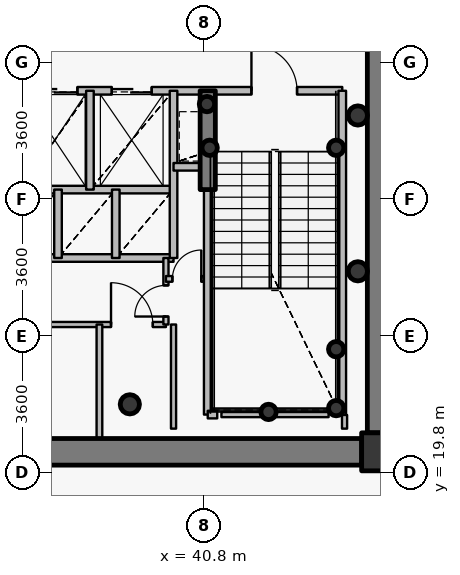
"""IFC4 building model, lengths in metres.
Left out: names, types, materials, properties, quantities, classifications, styles, units other than length and angle.
Written with IfcOpenShell. Run it as: python <this file> out.ifc"""

import sys

from ifc_helpers import new_model, si_unit, direction, frame, frame_2d, origin, origin_2d, place, context, subcontext, project, spatial, rectangle, hollow_circle, extrude, source, transform, mapped, element, fill, save


model = new_model("IFC4")
c1 = context("Model", 3, precision=1e-05, world=origin(), true_north=direction((0.0, 1.0)))
c2 = subcontext(c1, "Body", "Model", "MODEL_VIEW")
j1 = project(units=[si_unit("LENGTHUNIT", "METRE"), si_unit("PLANEANGLEUNIT", "RADIAN")], contexts=[c1])
p1 = place(None, origin())
s1 = spatial("IfcSite", under=j1, at=p1, CompositionType="ELEMENT")
p2 = place(p1, origin())
s2 = spatial("IfcBuilding", under=s1, at=p2, CompositionType="ELEMENT")
p3 = place(p2, frame((0.0, 0.0, 236.55)))
s3 = spatial("IfcBuildingStorey", under=s2, at=p3, CompositionType="ELEMENT", Elevation=236.55)
p4 = place(p3, frame((45.45, 20.35, 0.0), z_axis=(0.0, 0.0, 1.0), x_axis=(1.0, 0.0, 0.0)))
e1 = element("IfcColumn", 1, at=p4, inside=s3, PredefinedType="COLUMN", context=c2, shape_type="SweptSolid", body=[
    extrude(rectangle(XDim=1.0, YDim=1.0, at=origin_2d()), origin(), (0.0, 0.0, 1.0), 3.75),
])
p5 = place(p3, frame((38.85, 21.6, 0.0), z_axis=(0.0, 0.0, 1.0), x_axis=(1.0, 0.0, 0.0)))
e2 = element("IfcColumn", 2, at=p5, inside=s3, PredefinedType="COLUMN", context=c2, shape_type="SweptSolid", body=[
    extrude(hollow_circle(Radius=0.254, WallThickness=0.02, at=origin_2d()), origin(), (0.0, 0.0, 1.0), 3.75),
])
for number, where, z_axis, x_axis in (
    (3, (44.28, 21.5, 0.0), (0.0, 0.0, 1.0), (1.0, 0.0, 0.0)),
    (4, (44.28, 23.05, 0.0), (0.0, 0.0, 1.0), (1.0, 0.0, 0.0)),
    (5, (42.5, 21.4, 0.0), (0.0, 0.0, 1.0), (1.0, 0.0, 0.0)),
    (6, (40.95, 28.35, 0.0), (0.0, 0.0, 1.0), (1.0, 0.0, 0.0)),
    (7, (44.28, 28.35, 0.0), (0.0, 0.0, 1.0), (1.0, 0.0, 0.0)),
    (8, (40.88, 29.5, 0.0), (0.0, 0.0, 1.0), (1.0, 0.0, 0.0)),
):
    element("IfcColumn", number, at=place(p3, frame(where, z_axis=z_axis, x_axis=x_axis)), inside=s3, PredefinedType="COLUMN", context=c2, shape_type="SweptSolid", body=[
        extrude(hollow_circle(Radius=0.203, WallThickness=0.016, at=origin_2d()), origin(), (0.0, 0.0, 1.0), 3.75),
    ])
p6 = place(p3, frame((45.45, 33.15, 0.0), z_axis=(0.0, 0.0, 1.0), x_axis=(0.0, -1.0, 0.0)))
e9 = element("IfcWall", 9, at=p6, inside=s3, PredefinedType="SHEAR", context=c2, shape_type="SweptSolid", body=[
    extrude(rectangle(XDim=12.3, YDim=0.7, at=frame_2d((6.15, 0.0))), origin(), (0.0, 0.0, 1.0), 3.05),
])
p7 = place(p3, frame((44.95, 20.35, 0.0), z_axis=(0.0, 0.0, 1.0), x_axis=(-1.0, 0.0, 0.0)))
e10 = element("IfcWall", 10, at=p7, inside=s3, PredefinedType="SHEAR", context=c2, shape_type="SweptSolid", body=[
    extrude(rectangle(XDim=17.9, YDim=0.7, at=frame_2d((8.95, 0.0))), origin(), (0.0, 0.0, 1.0), 3.05),
])
p8 = place(p7, frame((9.7, 0.0, 0.0)))
e11 = element("IfcOpeningElement", 11, at=p8, cuts=e10, PredefinedType="OPENING", context=c2, shape_type="SweptSolid", body=[
    extrude(rectangle(XDim=1.15, YDim=2.15, at=origin_2d()), frame((0.575, 0.36, 1.075), z_axis=(0.0, -1.0, 0.0), x_axis=(1.0, 0.0, 0.0)), (0.0, 0.0, 1.0), 0.72),
])
p9 = place(p3, frame((40.9, 27.25, 0.0), z_axis=(0.0, 0.0, 1.0), x_axis=(0.0, 1.0, 0.0)))
e12 = element("IfcWall", 12, at=p9, inside=s3, PredefinedType="SHEAR", context=c2, shape_type="SweptSolid", body=[
    extrude(rectangle(XDim=2.6, YDim=0.4, at=frame_2d((1.3, 0.0))), origin(), (0.0, 0.0, 1.0), 3.1),
])
for number, where, z_axis, x_axis in (
    (13, (44.85, 25.1, 0.0), (0.0, 0.0, 1.0), (1.0, 0.0, 0.0)),
    (14, (44.85, 29.2, 0.0), (0.0, 0.0, 1.0), (1.0, 0.0, 0.0)),
):
    element("IfcColumn", number, at=place(p3, frame(where, z_axis=z_axis, x_axis=x_axis)), inside=s3, PredefinedType="COLUMN", context=c2, shape_type="SweptSolid", body=[
        extrude(hollow_circle(Radius=0.254, WallThickness=0.02, at=origin_2d()), origin(), (0.0, 0.0, 1.0), 3.75),
    ])
p10 = place(p3, frame((35.05, 27.25, 0.0), z_axis=(0.0, 0.0, 1.0), x_axis=(1.0, 0.0, 0.0)))
e15 = element("IfcWall", 15, at=p10, inside=s3, PredefinedType="PARTITIONING", context=c2, shape_type="SweptSolid", body=[
    extrude(rectangle(XDim=4.95, YDim=0.2, at=frame_2d((2.475, 0.0))), origin(), (0.0, 0.0, 1.0), 3.085),
])
p11 = place(p3, frame((35.45, 23.7, 0.0), z_axis=(0.0, 0.0, 1.0), x_axis=(1.0, 0.0, 0.0)))
e16 = element("IfcWall", 16, at=p11, inside=s3, PredefinedType="PARTITIONING", context=c2, shape_type="SweptSolid", body=[
    extrude(rectangle(XDim=4.35, YDim=0.135, at=frame_2d((2.175, 0.0))), origin(), (0.0, 0.0, 1.0), 3.085),
])
p12 = place(p11, frame((2.905, 0.0, 0.0)))
e17 = element("IfcOpeningElement", 17, at=p12, cuts=e16, PredefinedType="OPENING", context=c2, shape_type="SweptSolid", body=[
    extrude(rectangle(XDim=1.1, YDim=2.15, at=origin_2d()), frame((0.55, 0.078, 1.075), z_axis=(0.0, -1.0, 0.0), x_axis=(1.0, 0.0, 0.0)), (0.0, 0.0, 1.0), 0.155),
])
p13 = place(p3, frame((35.45, 25.45, 0.0), z_axis=(0.0, 0.0, 1.0), x_axis=(1.0, 0.0, 0.0)))
e18 = element("IfcWall", 18, at=p13, inside=s3, PredefinedType="PARTITIONING", context=c2, shape_type="SweptSolid", body=[
    extrude(rectangle(XDim=4.55, YDim=0.2, at=frame_2d((2.275, 0.0))), origin(), (0.0, 0.0, 1.0), 3.085),
])
p14 = place(p3, frame((35.95, 29.85, 0.0), z_axis=(0.0, 0.0, 1.0), x_axis=(1.0, 0.0, 0.0)))
e19 = element("IfcWall", 19, at=p14, inside=s3, PredefinedType="PARTITIONING", context=c2, shape_type="SweptSolid", body=[
    extrude(rectangle(XDim=8.49, YDim=0.2, at=frame_2d((4.245, 0.0))), origin(), (0.0, 0.0, 1.0), 3.085),
])
p15 = place(p14, frame((6.1, 0.0, 0.0)))
e20 = element("IfcOpeningElement", 20, at=p15, cuts=e19, PredefinedType="OPENING", context=c2, shape_type="SweptSolid", body=[
    extrude(rectangle(XDim=1.2, YDim=2.15, at=origin_2d()), frame((0.6, 0.11, 1.075), z_axis=(0.0, -1.0, 0.0), x_axis=(1.0, 0.0, 0.0)), (0.0, 0.0, 1.0), 0.22),
])
p16 = place(p14, frame((0.37, 0.0, 0.0)))
e21 = element("IfcOpeningElement", 21, at=p16, cuts=e19, PredefinedType="OPENING", context=c2, shape_type="SweptSolid", body=[
    extrude(rectangle(XDim=1.15, YDim=2.15, at=origin_2d()), frame((0.575, 0.11, 1.075), z_axis=(0.0, -1.0, 0.0), x_axis=(1.0, 0.0, 0.0)), (0.0, 0.0, 1.0), 0.22),
])
p17 = place(p14, frame((2.425, 0.0, 0.0)))
e22 = element("IfcOpeningElement", 22, at=p17, cuts=e19, PredefinedType="OPENING", context=c2, shape_type="SweptSolid", body=[
    extrude(rectangle(XDim=1.05, YDim=2.15, at=origin_2d()), frame((0.525, 0.11, 1.075), z_axis=(0.0, -1.0, 0.0), x_axis=(1.0, 0.0, 0.0)), (0.0, 0.0, 1.0), 0.22),
])
p18 = place(p3, frame((36.96, 25.45, 0.0), z_axis=(0.0, 0.0, 1.0), x_axis=(0.0, 1.0, 0.0)))
e23 = element("IfcWall", 23, at=p18, inside=s3, PredefinedType="PARTITIONING", context=c2, shape_type="SweptSolid", body=[
    extrude(rectangle(XDim=1.8, YDim=0.2, at=frame_2d((0.9, 0.0))), origin(), (0.0, 0.0, 1.0), 3.5),
])
p19 = place(p3, frame((37.8, 27.25, 0.0), z_axis=(0.0, 0.0, 1.0), x_axis=(0.0, 1.0, 0.0)))
e24 = element("IfcWall", 24, at=p19, inside=s3, PredefinedType="PARTITIONING", context=c2, shape_type="SweptSolid", body=[
    extrude(rectangle(XDim=2.6, YDim=0.2, at=frame_2d((1.3, 0.0))), origin(), (0.0, 0.0, 1.0), 3.5),
])
p20 = place(p3, frame((38.05, 20.18, 0.0), z_axis=(0.0, 0.0, 1.0), x_axis=(0.0, 1.0, 0.0)))
e25 = element("IfcWall", 25, at=p20, inside=s3, PredefinedType="PARTITIONING", context=c2, shape_type="SweptSolid", body=[
    extrude(rectangle(XDim=3.52, YDim=0.15, at=frame_2d((1.76, 0.0))), origin(), (0.0, 0.0, 1.0), 3.035),
])
p21 = place(p3, frame((38.48, 25.45, 0.0), z_axis=(0.0, 0.0, 1.0), x_axis=(0.0, 1.0, 0.0)))
e26 = element("IfcWall", 26, at=p21, inside=s3, PredefinedType="PARTITIONING", context=c2, shape_type="SweptSolid", body=[
    extrude(rectangle(XDim=1.8, YDim=0.2, at=frame_2d((0.9, 0.0))), origin(), (0.0, 0.0, 1.0), 3.5),
])
p22 = place(p3, frame((39.8, 23.7, 0.0), z_axis=(0.0, 0.0, 1.0), x_axis=(0.0, 1.0, 0.0)))
e27 = element("IfcWall", 27, at=p22, inside=s3, PredefinedType="PARTITIONING", context=c2, shape_type="SweptSolid", body=[
    extrude(rectangle(XDim=1.75, YDim=0.135, at=frame_2d((0.875, 0.0))), origin(), (0.0, 0.0, 1.0), 3.5),
])
p23 = place(p22, frame((0.21, 0.0, 0.0)))
e28 = element("IfcOpeningElement", 28, at=p23, cuts=e27, PredefinedType="OPENING", context=c2, shape_type="SweptSolid", body=[
    extrude(rectangle(XDim=0.82, YDim=2.1, at=origin_2d()), frame((0.41, 0.078, 1.05), z_axis=(0.0, -1.0, 0.0), x_axis=(1.0, 0.0, 0.0)), (0.0, 0.0, 1.0), 0.155),
])
p24 = place(p3, frame((39.8, 24.9, 0.0), z_axis=(0.0, 0.0, 1.0), x_axis=(1.0, 0.0, 0.0)))
e29 = element("IfcWall", 29, at=p24, inside=s3, PredefinedType="PARTITIONING", context=c2, shape_type="SweptSolid", body=[
    extrude(rectangle(XDim=1.1, YDim=0.15, at=frame_2d((0.55, 0.0))), origin(), (0.0, 0.0, 1.0), 3.5),
])
p25 = place(p24, frame((0.17, 0.0, 0.0)))
e30 = element("IfcOpeningElement", 30, at=p25, cuts=e29, PredefinedType="OPENING", context=c2, shape_type="SweptSolid", body=[
    extrude(rectangle(XDim=0.76, YDim=2.1, at=origin_2d()), frame((0.38, 0.085, 1.05), z_axis=(0.0, -1.0, 0.0), x_axis=(1.0, 0.0, 0.0)), (0.0, 0.0, 1.0), 0.17),
])
p26 = place(p3, frame((40.0, 25.45, 0.0), z_axis=(0.0, 0.0, 1.0), x_axis=(0.0, 1.0, 0.0)))
e31 = element("IfcWall", 31, at=p26, inside=s3, PredefinedType="PARTITIONING", context=c2, shape_type="SweptSolid", body=[
    extrude(rectangle(XDim=4.4, YDim=0.2, at=frame_2d((2.2, 0.0))), origin(), (0.0, 0.0, 1.0), 3.5),
])
p27 = place(p3, frame((40.0, 27.85, 0.0), z_axis=(0.0, 0.0, 1.0), x_axis=(1.0, 0.0, 0.0)))
e32 = element("IfcWall", 32, at=p27, inside=s3, PredefinedType="PARTITIONING", context=c2, shape_type="SweptSolid", body=[
    extrude(rectangle(XDim=0.9, YDim=0.2, at=frame_2d((0.45, 0.0))), origin(), (0.0, 0.0, 1.0), 3.5),
])
p28 = place(p3, frame((40.9, 21.33, 0.0), z_axis=(0.0, 0.0, 1.0), x_axis=(0.0, 1.0, 0.0)))
e33 = element("IfcWall", 33, at=p28, inside=s3, PredefinedType="PARTITIONING", context=c2, shape_type="SweptSolid", body=[
    extrude(rectangle(XDim=5.91, YDim=0.2, at=frame_2d((2.955, 0.0))), origin(), (0.0, 0.0, 1.0), 3.035),
])
p29 = place(p3, frame((40.9, 21.33, 0.0), z_axis=(0.0, 0.0, 1.0), x_axis=(1.0, 0.0, 0.0)))
e34 = element("IfcWall", 34, at=p29, inside=s3, PredefinedType="PARTITIONING", context=c2, shape_type="SweptSolid", body=[
    extrude(rectangle(XDim=0.25, YDim=0.2, at=frame_2d((0.125, 0.0))), origin(), (0.0, 0.0, 1.0), 3.035),
])
p30 = place(p3, frame((44.44, 21.33, 0.0), z_axis=(0.0, 0.0, 1.0), x_axis=(0.0, 1.0, 0.0)))
e35 = element("IfcWall", 35, at=p30, inside=s3, PredefinedType="PARTITIONING", context=c2, shape_type="SweptSolid", body=[
    extrude(rectangle(XDim=8.52, YDim=0.2, at=frame_2d((4.26, 0.0))), origin(), (0.0, 0.0, 1.0), 3.5),
])
p31 = place(p3, frame((44.08, 21.33, 0.0), z_axis=(0.0, 0.0, 1.0), x_axis=(-1.0, 0.0, 0.0)))
e36 = element("IfcWall", 36, at=p31, inside=s3, PredefinedType="PARTITIONING", context=c2, shape_type="SweptSolid", body=[
    extrude(rectangle(XDim=2.82, YDim=0.135, at=frame_2d((1.41, 0.0))), origin(), (0.0, 0.0, 1.0), 3.035),
])
p32 = place(p3, frame((40.0, 23.7, 0.0), z_axis=(0.0, 0.0, 1.0), x_axis=(0.0, -1.0, 0.0)))
e37 = element("IfcWall", 37, at=p32, inside=s3, PredefinedType="PARTITIONING", context=c2, shape_type="SweptSolid", body=[
    extrude(rectangle(XDim=2.74, YDim=0.135, at=frame_2d((1.37, 0.0))), origin(), (0.0, 0.0, 1.0), 3.035),
])
p33 = place(p3, frame((44.5, 20.96, 0.0), z_axis=(0.0, 0.0, 1.0), x_axis=(0.0, 1.0, 0.0)))
e38 = element("IfcWall", 38, at=p33, inside=s3, PredefinedType="PARTITIONING", context=c2, shape_type="SweptSolid", body=[
    extrude(rectangle(XDim=0.36, YDim=0.135, at=frame_2d((0.18, 0.0))), origin(), (0.0, 0.0, 1.0), 3.5),
])
p34 = place(p3, frame((44.96, 20.0, 0.0), z_axis=(0.0, 0.0, 1.0), x_axis=(1.0, 0.0, 0.0)))
e39 = element("IfcWall", 39, at=p34, inside=s3, PredefinedType="PARTITIONING", context=c2, shape_type="SweptSolid", body=[
    extrude(rectangle(XDim=0.83, YDim=0.135, at=frame_2d((0.415, 0.0))), origin(), (0.0, 0.0, 1.0), 2.935),
])
m1 = source(origin(), c2, "Body", "SweptSolid", [
    extrude(rectangle(XDim=1.2, YDim=2.15, at=origin_2d()), frame((0.6, 0.025, 1.075), z_axis=(0.0, -1.0, 0.0), x_axis=(1.0, 0.0, 0.0)), (0.0, 0.0, 1.0), 0.05),
])
p35 = place(p15, origin())
e40 = element("IfcDoor", 40, at=p35, inside=s3, OperationType="SINGLE_SWING_LEFT", PredefinedType="DOOR", context=c2, shape_type="MappedRepresentation", body=[
    mapped(m1, transform((0.0, 0.0, 0.0), x_axis=(1.0, 0.0, 0.0), y_axis=(0.0, 1.0, 0.0), z_axis=(0.0, 0.0, 1.0), scale=1.0)),
])
fill(e20, e40)
m2 = source(origin(), c2, "Body", "SweptSolid", [
    extrude(rectangle(XDim=1.15, YDim=2.15, at=origin_2d()), frame((0.575, 0.025, 1.075), z_axis=(0.0, -1.0, 0.0), x_axis=(1.0, 0.0, 0.0)), (0.0, 0.0, 1.0), 0.05),
])
p36 = place(p16, origin())
e41 = element("IfcDoor", 41, at=p36, inside=s3, OperationType="DOUBLE_DOOR_SLIDING", PredefinedType="USERDEFINED", context=c2, shape_type="MappedRepresentation", body=[
    mapped(m2, transform((0.0, 0.0, 0.0), x_axis=(1.0, 0.0, 0.0), y_axis=(0.0, 1.0, 0.0), z_axis=(0.0, 0.0, 1.0), scale=1.0)),
])
fill(e21, e41)
m3 = source(origin(), c2, "Body", "SweptSolid", [
    extrude(rectangle(XDim=1.05, YDim=2.15, at=origin_2d()), frame((0.525, 0.025, 1.075), z_axis=(0.0, -1.0, 0.0), x_axis=(1.0, 0.0, 0.0)), (0.0, 0.0, 1.0), 0.05),
])
p37 = place(p17, origin())
e42 = element("IfcDoor", 42, at=p37, inside=s3, OperationType="DOUBLE_DOOR_SLIDING", PredefinedType="USERDEFINED", context=c2, shape_type="MappedRepresentation", body=[
    mapped(m3, transform((0.0, 0.0, 0.0), x_axis=(1.0, 0.0, 0.0), y_axis=(0.0, 1.0, 0.0), z_axis=(0.0, 0.0, 1.0), scale=1.0)),
])
fill(e22, e42)
m4 = source(origin(), c2, "Body", "SweptSolid", [
    extrude(rectangle(XDim=1.1, YDim=2.15, at=origin_2d()), frame((0.55, 0.025, 1.075), z_axis=(0.0, -1.0, 0.0), x_axis=(1.0, 0.0, 0.0)), (0.0, 0.0, 1.0), 0.05),
])
p38 = place(p12, origin())
e43 = element("IfcDoor", 43, at=p38, inside=s3, OperationType="SINGLE_SWING_LEFT", PredefinedType="DOOR", context=c2, shape_type="MappedRepresentation", body=[
    mapped(m4, transform((0.0, 0.0, 0.0), x_axis=(1.0, 0.0, 0.0), y_axis=(0.0, 1.0, 0.0), z_axis=(0.0, 0.0, 1.0), scale=1.0)),
])
fill(e17, e43)
m5 = source(origin(), c2, "Body", "SweptSolid", [
    extrude(rectangle(XDim=0.82, YDim=2.1, at=origin_2d()), frame((0.41, 0.025, 1.05), z_axis=(0.0, -1.0, 0.0), x_axis=(1.0, 0.0, 0.0)), (0.0, 0.0, 1.0), 0.05),
])
p39 = place(p23, origin())
e44 = element("IfcDoor", 44, at=p39, inside=s3, OperationType="SINGLE_SWING_LEFT", PredefinedType="DOOR", context=c2, shape_type="MappedRepresentation", body=[
    mapped(m5, transform((0.0, 0.0, 0.0), x_axis=(1.0, 0.0, 0.0), y_axis=(0.0, 1.0, 0.0), z_axis=(0.0, 0.0, 1.0), scale=1.0)),
])
fill(e28, e44)
m6 = source(origin(), c2, "Body", "SweptSolid", [
    extrude(rectangle(XDim=0.76, YDim=2.1, at=origin_2d()), frame((0.38, 0.025, 1.05), z_axis=(0.0, -1.0, 0.0), x_axis=(1.0, 0.0, 0.0)), (0.0, 0.0, 1.0), 0.05),
])
p40 = place(p25, origin())
e45 = element("IfcDoor", 45, at=p40, inside=s3, OperationType="SINGLE_SWING_RIGHT", PredefinedType="DOOR", context=c2, shape_type="MappedRepresentation", body=[
    mapped(m6, transform((0.0, 0.0, 0.0), x_axis=(1.0, 0.0, 0.0), y_axis=(0.0, 1.0, 0.0), z_axis=(0.0, 0.0, 1.0), scale=1.0)),
])
fill(e30, e45)
save(model, sys.argv[1])
